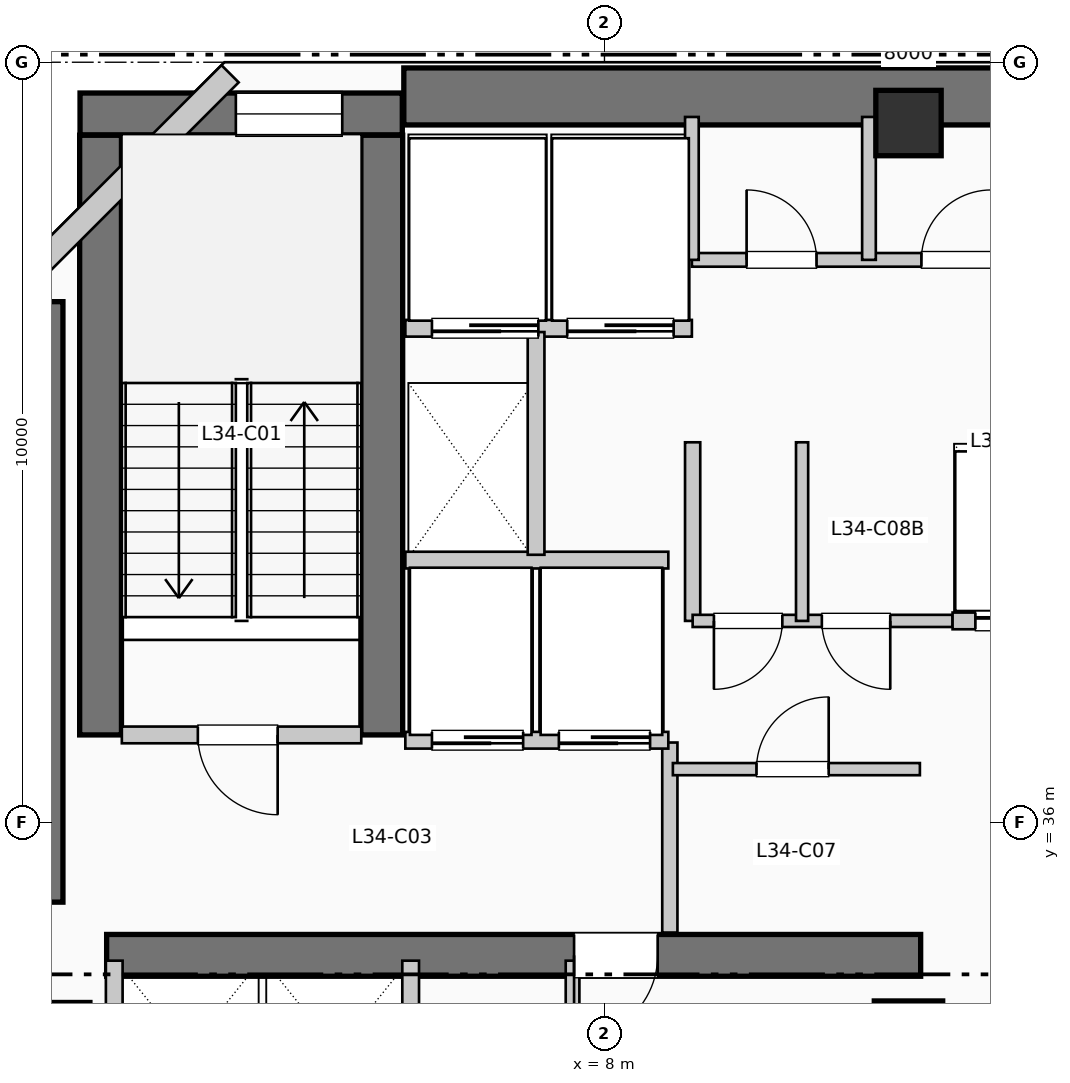
"""IFC4 building model, lengths in metres.
Left out: names, types, materials, properties, quantities, classifications, styles, units other than length and angle.
Written with IfcOpenShell. Run it as: python <this file> out.ifc"""

import sys

from ifc_helpers import new_model, si_unit, direction, frame, frame_2d, origin, origin_2d, place, context, subcontext, project, spatial, rectangle, extrude, element, fill, save


model = new_model("IFC4")
c1 = context("Model", 3, precision=1e-05, world=origin(), true_north=direction((0.0, 1.0)))
c2 = subcontext(c1, "Body", "Model", "MODEL_VIEW")
j1 = project(units=[si_unit("LENGTHUNIT", "METRE"), si_unit("PLANEANGLEUNIT", "RADIAN")], contexts=[c1])
p1 = place(None, origin())
s1 = spatial("IfcSite", under=j1, at=p1, CompositionType="ELEMENT")
p2 = place(p1, origin())
s2 = spatial("IfcBuilding", under=s1, at=p2, CompositionType="ELEMENT")
p3 = place(p2, frame((0.0, 0.0, 142.89)))
s3 = spatial("IfcBuildingStorey", under=s2, at=p3, CompositionType="ELEMENT", Elevation=142.89)
p4 = place(p3, frame((5.36, 45.55, 0.0), z_axis=(0.0, 0.0, 1.0), x_axis=(1.0, 0.0, 0.0)))
e1 = element("IfcWall", 1, at=p4, inside=s3, PredefinedType="SHEAR", context=c2, shape_type="SweptSolid", body=[
    extrude(rectangle(XDim=13.98, YDim=0.75, at=frame_2d((6.99, 0.0))), origin(), (0.0, 0.0, 1.0), 3.96),
])
p5 = place(p3, frame((0.5, 34.95, 0.0), z_axis=(0.0, 0.0, 1.0), x_axis=(0.0, 1.0, 0.0)))
e2 = element("IfcWall", 2, at=p5, inside=s3, PredefinedType="SHEAR", context=c2, shape_type="SweptSolid", body=[
    extrude(rectangle(XDim=7.9, YDim=0.75, at=frame_2d((3.95, 0.0))), origin(), (0.0, 0.0, 1.0), 3.96),
])
p6 = place(p3, frame((1.45, 34.25, 0.0), z_axis=(0.0, 0.0, 1.0), x_axis=(1.0, 0.0, 0.0)))
e3 = element("IfcWall", 3, at=p6, inside=s3, PredefinedType="SHEAR", context=c2, shape_type="SweptSolid", body=[
    extrude(rectangle(XDim=10.71, YDim=0.55, at=frame_2d((5.355, 0.0))), origin(), (0.0, 0.0, 1.0), 3.96),
])
p7 = place(p6, frame((7.25, 0.0, 0.0), z_axis=(0.0, 0.0, 1.0), x_axis=(-1.0, 0.0, 0.0)))
e4 = element("IfcOpeningElement", 4, at=p7, cuts=e3, PredefinedType="OPENING", context=c2, shape_type="SweptSolid", body=[
    extrude(rectangle(XDim=1.1, YDim=2.15, at=frame_2d((0.55, 1.075))), frame((0.0, 0.285, 0.0), z_axis=(0.0, -1.0, 0.0), x_axis=(1.0, 0.0, 0.0)), (0.0, 0.0, 1.0), 0.57),
])
for number, where, z_axis, x_axis in (
    (5, (1.37, 37.15, 0.0), (0.0, 0.0, 1.0), (0.0, 1.0, 0.0)),
    (6, (5.07, 37.15, 0.0), (0.0, 0.0, 1.0), (0.0, 1.0, 0.0)),
):
    element("IfcWall", number, at=place(p3, frame(where, z_axis=z_axis, x_axis=x_axis)), inside=s3, PredefinedType="SHEAR", context=c2, shape_type="SweptSolid", body=[
        extrude(rectangle(XDim=7.89, YDim=0.55, at=frame_2d((3.945, 0.0))), origin(), (0.0, 0.0, 1.0), 3.96),
    ])
p8 = place(p3, frame((1.1, 45.32, 0.0), z_axis=(0.0, 0.0, 1.0), x_axis=(1.0, 0.0, 0.0)))
e7 = element("IfcWall", 7, at=p8, inside=s3, PredefinedType="SHEAR", context=c2, shape_type="SweptSolid", body=[
    extrude(rectangle(XDim=4.24, YDim=0.55, at=frame_2d((2.12, 0.0))), origin(), (0.0, 0.0, 1.0), 3.96),
])
p9 = place(p8, frame((2.05, 0.0, 1.05)))
e8 = element("IfcOpeningElement", 8, at=p9, cuts=e7, PredefinedType="OPENING", context=c2, shape_type="SweptSolid", body=[
    extrude(rectangle(XDim=1.4, YDim=1.8, at=frame_2d((0.7, 0.9))), frame((0.0, 0.285, 0.0), z_axis=(0.0, -1.0, 0.0), x_axis=(1.0, 0.0, 0.0)), (0.0, 0.0, 1.0), 0.57),
])
p10 = place(p3, frame((0.8, 33.2, 0.0), z_axis=(0.0, 0.0, 1.0), x_axis=(1.0, 0.0, 0.0)))
e9 = element("IfcColumn", 9, at=p10, inside=s3, PredefinedType="COLUMN", context=c2, shape_type="SweptSolid", body=[
    extrude(rectangle(XDim=0.86, YDim=0.86, at=origin_2d()), origin(), (0.0, 0.0, 1.0), 3.96),
])
p11 = place(p3, frame((12.0, 33.2, 0.0), z_axis=(0.0, 0.0, 1.0), x_axis=(1.0, 0.0, 0.0)))
e10 = element("IfcColumn", 10, at=p11, inside=s3, PredefinedType="COLUMN", context=c2, shape_type="SweptSolid", body=[
    extrude(rectangle(XDim=0.9, YDim=0.9, at=origin_2d()), origin(), (0.0, 0.0, 1.0), 3.96),
])
p12 = place(p3, frame((12.0, 45.2, 0.0), z_axis=(0.0, 0.0, 1.0), x_axis=(1.0, 0.0, 0.0)))
e11 = element("IfcColumn", 11, at=p12, inside=s3, PredefinedType="COLUMN", context=c2, shape_type="SweptSolid", body=[
    extrude(rectangle(XDim=0.86, YDim=0.86, at=origin_2d()), origin(), (0.0, 0.0, 1.0), 3.96),
])
p13 = place(p3, frame((3.074, 45.848, 0.0), z_axis=(0.0, 0.0, 1.0), x_axis=(-0.707106781187, -0.707106781187, 0.0)))
e12 = element("IfcWall", 12, at=p13, inside=s3, PredefinedType="SOLIDWALL", context=c2, shape_type="SweptSolid", body=[
    extrude(rectangle(XDim=4.133, YDim=0.32, at=frame_2d((2.066, 0.0))), origin(), (0.0, 0.0, 1.0), 3.71),
])
p14 = place(p3, frame((1.65, 37.15, 0.0), z_axis=(0.0, 0.0, 1.0), x_axis=(1.0, 0.0, 0.0)))
e13 = element("IfcWall", 13, at=p14, inside=s3, PredefinedType="PARTITIONING", context=c2, shape_type="SweptSolid", body=[
    extrude(rectangle(XDim=3.15, YDim=0.22, at=frame_2d((1.575, 0.0))), origin(), (0.0, 0.0, 1.0), 3.71),
])
p15 = place(p14, frame((2.05, 0.0, 0.0), z_axis=(0.0, 0.0, 1.0), x_axis=(-1.0, 0.0, 0.0)))
e14 = element("IfcOpeningElement", 14, at=p15, cuts=e13, PredefinedType="OPENING", context=c2, shape_type="SweptSolid", body=[
    extrude(rectangle(XDim=1.05, YDim=2.15, at=frame_2d((0.525, 1.075))), frame((0.0, 0.12, 0.0), z_axis=(0.0, -1.0, 0.0), x_axis=(1.0, 0.0, 0.0)), (0.0, 0.0, 1.0), 0.24),
])
p16 = place(p3, frame((8.86, 34.55, 0.0), z_axis=(0.0, 0.0, 1.0), x_axis=(0.0, 1.0, 0.0)))
e15 = element("IfcWall", 15, at=p16, inside=s3, PredefinedType="PARTITIONING", context=c2, shape_type="SweptSolid", body=[
    extrude(rectangle(XDim=2.5, YDim=0.2, at=frame_2d((1.25, 0.0))), origin(), (0.0, 0.0, 1.0), 3.71),
])
p17 = place(p3, frame((5.38, 37.08, 0.0), z_axis=(0.0, 0.0, 1.0), x_axis=(1.0, 0.0, 0.0)))
e16 = element("IfcWall", 16, at=p17, inside=s3, PredefinedType="PARTITIONING", context=c2, shape_type="SweptSolid", body=[
    extrude(rectangle(XDim=3.46, YDim=0.22, at=frame_2d((1.73, 0.0))), origin(), (0.0, 0.0, 1.0), 3.71),
])
p18 = place(p17, frame((1.55, 0.0, 0.0), z_axis=(0.0, 0.0, 1.0), x_axis=(-1.0, 0.0, 0.0)))
e17 = element("IfcOpeningElement", 17, at=p18, cuts=e16, PredefinedType="OPENING", context=c2, shape_type="SweptSolid", body=[
    extrude(rectangle(XDim=1.2, YDim=2.2, at=frame_2d((0.6, 1.1))), frame((0.0, 0.12, 0.0), z_axis=(0.0, -1.0, 0.0), x_axis=(1.0, 0.0, 0.0)), (0.0, 0.0, 1.0), 0.24),
])
p19 = place(p17, frame((3.22, 0.0, 0.0), z_axis=(0.0, 0.0, 1.0), x_axis=(-1.0, 0.0, 0.0)))
e18 = element("IfcOpeningElement", 18, at=p19, cuts=e16, PredefinedType="OPENING", context=c2, shape_type="SweptSolid", body=[
    extrude(rectangle(XDim=1.2, YDim=2.2, at=frame_2d((0.6, 1.1))), frame((0.0, 0.12, 0.0), z_axis=(0.0, -1.0, 0.0), x_axis=(1.0, 0.0, 0.0)), (0.0, 0.0, 1.0), 0.24),
])
p20 = place(p3, frame((5.38, 39.45, 0.0), z_axis=(0.0, 0.0, 1.0), x_axis=(1.0, 0.0, 0.0)))
e19 = element("IfcWall", 19, at=p20, inside=s3, PredefinedType="PARTITIONING", context=c2, shape_type="SweptSolid", body=[
    extrude(rectangle(XDim=3.46, YDim=0.22, at=frame_2d((1.73, 0.0))), origin(), (0.0, 0.0, 1.0), 3.71),
])
p21 = place(p3, frame((5.38, 42.5, 0.0), z_axis=(0.0, 0.0, 1.0), x_axis=(1.0, 0.0, 0.0)))
e20 = element("IfcWall", 20, at=p21, inside=s3, PredefinedType="PARTITIONING", context=c2, shape_type="SweptSolid", body=[
    extrude(rectangle(XDim=3.77, YDim=0.22, at=frame_2d((1.885, 0.0))), origin(), (0.0, 0.0, 1.0), 3.71),
])
p22 = place(p21, frame((1.75, 0.0, 0.0), z_axis=(0.0, 0.0, 1.0), x_axis=(-1.0, 0.0, 0.0)))
e21 = element("IfcOpeningElement", 21, at=p22, cuts=e20, PredefinedType="OPENING", context=c2, shape_type="SweptSolid", body=[
    extrude(rectangle(XDim=1.4, YDim=2.2, at=frame_2d((0.7, 1.1))), frame((0.0, 0.12, 0.0), z_axis=(0.0, -1.0, 0.0), x_axis=(1.0, 0.0, 0.0)), (0.0, 0.0, 1.0), 0.24),
])
p23 = place(p21, frame((3.53, 0.0, 0.0), z_axis=(0.0, 0.0, 1.0), x_axis=(-1.0, 0.0, 0.0)))
e22 = element("IfcOpeningElement", 22, at=p23, cuts=e20, PredefinedType="OPENING", context=c2, shape_type="SweptSolid", body=[
    extrude(rectangle(XDim=1.4, YDim=2.2, at=frame_2d((0.7, 1.1))), frame((0.0, 0.12, 0.0), z_axis=(0.0, -1.0, 0.0), x_axis=(1.0, 0.0, 0.0)), (0.0, 0.0, 1.0), 0.24),
])
p24 = place(p3, frame((7.1, 39.52, 0.0), z_axis=(0.0, 0.0, 1.0), x_axis=(0.0, 1.0, 0.0)))
e23 = element("IfcWall", 23, at=p24, inside=s3, PredefinedType="PARTITIONING", context=c2, shape_type="SweptSolid", body=[
    extrude(rectangle(XDim=2.93, YDim=0.22, at=frame_2d((1.465, 0.0))), origin(), (0.0, 0.0, 1.0), 3.71),
])
for number, where, z_axis, x_axis in (
    (24, (1.55, 31.8, 0.0), (0.0, 0.0, 1.0), (0.0, 1.0, 0.0)),
    (25, (5.45, 31.8, 0.0), (0.0, 0.0, 1.0), (0.0, 1.0, 0.0)),
):
    element("IfcWall", number, at=place(p3, frame(where, z_axis=z_axis, x_axis=x_axis)), inside=s3, PredefinedType="PARTITIONING", context=c2, shape_type="SweptSolid", body=[
        extrude(rectangle(XDim=2.38, YDim=0.22, at=frame_2d((1.19, 0.0))), origin(), (0.0, 0.0, 1.0), 3.71),
    ])
p25 = place(p3, frame((9.16, 38.65, 0.0), z_axis=(0.0, 0.0, 1.0), x_axis=(0.0, 1.0, 0.0)))
e26 = element("IfcWall", 26, at=p25, inside=s3, PredefinedType="PARTITIONING", context=c2, shape_type="SweptSolid", body=[
    extrude(rectangle(XDim=2.35, YDim=0.2, at=frame_2d((1.175, 0.0))), origin(), (0.0, 0.0, 1.0), 3.71),
])
p26 = place(p3, frame((7.58, 31.82, 0.0), z_axis=(0.0, 0.0, 1.0), x_axis=(0.0, 1.0, 0.0)))
e27 = element("IfcWall", 27, at=p26, inside=s3, PredefinedType="PLUMBINGWALL", context=c2, shape_type="SweptSolid", body=[
    extrude(rectangle(XDim=2.36, YDim=0.18, at=frame_2d((1.18, 0.0))), origin(), (0.0, 0.0, 1.0), 3.71),
])
p27 = place(p3, frame((8.9, 36.7, 0.0), z_axis=(0.0, 0.0, 1.0), x_axis=(1.0, 0.0, 0.0)))
e28 = element("IfcWall", 28, at=p27, inside=s3, PredefinedType="PARTITIONING", context=c2, shape_type="SweptSolid", body=[
    extrude(rectangle(XDim=3.25, YDim=0.16, at=frame_2d((1.625, 0.0))), origin(), (0.0, 0.0, 1.0), 3.71),
])
p28 = place(p27, frame((1.1, 0.0, 0.0)))
e29 = element("IfcOpeningElement", 29, at=p28, cuts=e28, PredefinedType="OPENING", context=c2, shape_type="SweptSolid", body=[
    extrude(rectangle(XDim=0.95, YDim=2.15, at=frame_2d((0.475, 1.075))), frame((0.0, 0.09, 0.0), z_axis=(0.0, -1.0, 0.0), x_axis=(1.0, 0.0, 0.0)), (0.0, 0.0, 1.0), 0.18),
])
p29 = place(p3, frame((9.16, 38.65, 0.0), z_axis=(0.0, 0.0, 1.0), x_axis=(1.0, 0.0, 0.0)))
e30 = element("IfcWall", 30, at=p29, inside=s3, PredefinedType="PARTITIONING", context=c2, shape_type="SweptSolid", body=[
    extrude(rectangle(XDim=3.42, YDim=0.16, at=frame_2d((1.71, 0.0))), origin(), (0.0, 0.0, 1.0), 3.71),
])
p30 = place(p29, frame((1.18, 0.0, 0.0), z_axis=(0.0, 0.0, 1.0), x_axis=(-1.0, 0.0, 0.0)))
e31 = element("IfcOpeningElement", 31, at=p30, cuts=e30, PredefinedType="OPENING", context=c2, shape_type="SweptSolid", body=[
    extrude(rectangle(XDim=0.9, YDim=2.15, at=frame_2d((0.45, 1.075))), frame((0.0, 0.09, 0.0), z_axis=(0.0, -1.0, 0.0), x_axis=(1.0, 0.0, 0.0)), (0.0, 0.0, 1.0), 0.18),
])
p31 = place(p29, frame((2.6, 0.0, 0.0), z_axis=(0.0, 0.0, 1.0), x_axis=(-1.0, 0.0, 0.0)))
e32 = element("IfcOpeningElement", 32, at=p31, cuts=e30, PredefinedType="OPENING", context=c2, shape_type="SweptSolid", body=[
    extrude(rectangle(XDim=0.9, YDim=2.15, at=frame_2d((0.45, 1.075))), frame((0.0, 0.09, 0.0), z_axis=(0.0, -1.0, 0.0), x_axis=(1.0, 0.0, 0.0)), (0.0, 0.0, 1.0), 0.18),
])
p32 = place(p3, frame((10.6, 38.65, 0.0), z_axis=(0.0, 0.0, 1.0), x_axis=(0.0, 1.0, 0.0)))
e33 = element("IfcWall", 33, at=p32, inside=s3, PredefinedType="PARTITIONING", context=c2, shape_type="SweptSolid", body=[
    extrude(rectangle(XDim=2.35, YDim=0.16, at=frame_2d((1.175, 0.0))), origin(), (0.0, 0.0, 1.0), 3.71),
])
p33 = place(p3, frame((12.58, 38.65, 0.0), z_axis=(0.0, 0.0, 1.0), x_axis=(1.0, 0.0, 0.0)))
e34 = element("IfcWall", 34, at=p33, inside=s3, PredefinedType="PARTITIONING", context=c2, shape_type="SweptSolid", body=[
    extrude(rectangle(XDim=3.38, YDim=0.22, at=frame_2d((1.69, 0.0))), origin(), (0.0, 0.0, 1.0), 3.71),
])
p34 = place(p33, frame((0.3, 0.0, 0.0)))
e35 = element("IfcOpeningElement", 35, at=p34, cuts=e34, PredefinedType="OPENING", context=c2, shape_type="SweptSolid", body=[
    extrude(rectangle(XDim=1.1, YDim=2.2, at=frame_2d((0.55, 1.1))), frame((0.0, 0.12, 0.0), z_axis=(0.0, -1.0, 0.0), x_axis=(1.0, 0.0, 0.0)), (0.0, 0.0, 1.0), 0.24),
])
p35 = place(p33, frame((1.95, 0.0, 0.0)))
e36 = element("IfcOpeningElement", 36, at=p35, cuts=e34, PredefinedType="OPENING", context=c2, shape_type="SweptSolid", body=[
    extrude(rectangle(XDim=1.1, YDim=2.2, at=frame_2d((0.55, 1.1))), frame((0.0, 0.12, 0.0), z_axis=(0.0, -1.0, 0.0), x_axis=(1.0, 0.0, 0.0)), (0.0, 0.0, 1.0), 0.24),
])
p36 = place(p3, frame((9.15, 43.4, 0.0), z_axis=(0.0, 0.0, 1.0), x_axis=(1.0, 0.0, 0.0)))
e37 = element("IfcWall", 37, at=p36, inside=s3, PredefinedType="PLUMBINGWALL", context=c2, shape_type="SweptSolid", body=[
    extrude(rectangle(XDim=9.33, YDim=0.18, at=frame_2d((4.665, 0.0))), origin(), (0.0, 0.0, 1.0), 3.71),
])
p37 = place(p36, frame((0.72, 0.0, 0.0)))
e38 = element("IfcOpeningElement", 38, at=p37, cuts=e37, PredefinedType="OPENING", context=c2, shape_type="SweptSolid", body=[
    extrude(rectangle(XDim=0.92, YDim=2.1, at=frame_2d((0.46, 1.05))), frame((0.0, 0.1, 0.0), z_axis=(0.0, -1.0, 0.0), x_axis=(1.0, 0.0, 0.0)), (0.0, 0.0, 1.0), 0.2),
])
p38 = place(p36, frame((3.02, 0.0, 0.0)))
e39 = element("IfcOpeningElement", 39, at=p38, cuts=e37, PredefinedType="OPENING", context=c2, shape_type="SweptSolid", body=[
    extrude(rectangle(XDim=0.92, YDim=2.1, at=frame_2d((0.46, 1.05))), frame((0.0, 0.1, 0.0), z_axis=(0.0, -1.0, 0.0), x_axis=(1.0, 0.0, 0.0)), (0.0, 0.0, 1.0), 0.2),
])
p39 = place(p36, frame((5.34, 0.0, 0.0)))
e40 = element("IfcOpeningElement", 40, at=p39, cuts=e37, PredefinedType="OPENING", context=c2, shape_type="SweptSolid", body=[
    extrude(rectangle(XDim=0.92, YDim=2.1, at=frame_2d((0.46, 1.05))), frame((0.0, 0.1, 0.0), z_axis=(0.0, -1.0, 0.0), x_axis=(1.0, 0.0, 0.0)), (0.0, 0.0, 1.0), 0.2),
])
p40 = place(p36, frame((7.66, 0.0, 0.0)))
e41 = element("IfcOpeningElement", 41, at=p40, cuts=e37, PredefinedType="OPENING", context=c2, shape_type="SweptSolid", body=[
    extrude(rectangle(XDim=0.95, YDim=2.1, at=frame_2d((0.475, 1.05))), frame((0.0, 0.1, 0.0), z_axis=(0.0, -1.0, 0.0), x_axis=(1.0, 0.0, 0.0)), (0.0, 0.0, 1.0), 0.2),
])
for number, where, z_axis, x_axis in (
    (42, (9.15, 43.4, 0.0), (0.0, 0.0, 1.0), (0.0, 1.0, 0.0)),
    (43, (11.48, 43.4, 0.0), (0.0, 0.0, 1.0), (0.0, 1.0, 0.0)),
):
    element("IfcWall", number, at=place(p3, frame(where, z_axis=z_axis, x_axis=x_axis)), inside=s3, PredefinedType="PLUMBINGWALL", context=c2, shape_type="SweptSolid", body=[
        extrude(rectangle(XDim=1.88, YDim=0.18, at=frame_2d((0.94, 0.0))), origin(), (0.0, 0.0, 1.0), 3.71),
    ])
p41 = place(p9, origin())
e44 = element("IfcWindow", 44, at=p41, inside=s3, PartitioningType="SINGLE_PANEL", PredefinedType="WINDOW", context=c2, shape_type="SweptSolid", body=[
    extrude(rectangle(XDim=1.4, YDim=1.8, at=frame_2d((0.7, 0.9))), frame((0.0, 0.03, 0.0), z_axis=(0.0, -1.0, 0.0), x_axis=(1.0, 0.0, 0.0)), (0.0, 0.0, 1.0), 0.06),
])
fill(e8, e44)
p42 = place(p15, origin())
e45 = element("IfcDoor", 45, at=p42, inside=s3, OperationType="SINGLE_SWING_RIGHT", PredefinedType="DOOR", context=c2, shape_type="SweptSolid", body=[
    extrude(rectangle(XDim=1.05, YDim=2.15, at=frame_2d((0.525, 1.075))), frame((0.0, 0.025, 0.0), z_axis=(0.0, -1.0, 0.0), x_axis=(1.0, 0.0, 0.0)), (0.0, 0.0, 1.0), 0.05),
])
fill(e14, e45)
p43 = place(p7, origin())
e46 = element("IfcDoor", 46, at=p43, inside=s3, OperationType="SINGLE_SWING_LEFT", PredefinedType="DOOR", context=c2, shape_type="SweptSolid", body=[
    extrude(rectangle(XDim=1.1, YDim=2.15, at=frame_2d((0.55, 1.075))), frame((0.0, 0.025, 0.0), z_axis=(0.0, -1.0, 0.0), x_axis=(1.0, 0.0, 0.0)), (0.0, 0.0, 1.0), 0.05),
])
fill(e4, e46)
p44 = place(p18, origin())
e47 = element("IfcDoor", 47, at=p44, inside=s3, OperationType="SLIDING_TO_RIGHT", PredefinedType="DOOR", context=c2, shape_type="SweptSolid", body=[
    extrude(rectangle(XDim=1.2, YDim=2.2, at=frame_2d((0.6, 1.1))), frame((0.0, 0.025, 0.0), z_axis=(0.0, -1.0, 0.0), x_axis=(1.0, 0.0, 0.0)), (0.0, 0.0, 1.0), 0.05),
])
fill(e17, e47)
p45 = place(p19, origin())
e48 = element("IfcDoor", 48, at=p45, inside=s3, OperationType="SLIDING_TO_RIGHT", PredefinedType="DOOR", context=c2, shape_type="SweptSolid", body=[
    extrude(rectangle(XDim=1.2, YDim=2.2, at=frame_2d((0.6, 1.1))), frame((0.0, 0.025, 0.0), z_axis=(0.0, -1.0, 0.0), x_axis=(1.0, 0.0, 0.0)), (0.0, 0.0, 1.0), 0.05),
])
fill(e18, e48)
p46 = place(p22, origin())
e49 = element("IfcDoor", 49, at=p46, inside=s3, OperationType="SLIDING_TO_LEFT", PredefinedType="DOOR", context=c2, shape_type="SweptSolid", body=[
    extrude(rectangle(XDim=1.4, YDim=2.2, at=frame_2d((0.7, 1.1))), frame((0.0, 0.025, 0.0), z_axis=(0.0, -1.0, 0.0), x_axis=(1.0, 0.0, 0.0)), (0.0, 0.0, 1.0), 0.05),
])
fill(e21, e49)
p47 = place(p23, origin())
e50 = element("IfcDoor", 50, at=p47, inside=s3, OperationType="SLIDING_TO_LEFT", PredefinedType="DOOR", context=c2, shape_type="SweptSolid", body=[
    extrude(rectangle(XDim=1.4, YDim=2.2, at=frame_2d((0.7, 1.1))), frame((0.0, 0.025, 0.0), z_axis=(0.0, -1.0, 0.0), x_axis=(1.0, 0.0, 0.0)), (0.0, 0.0, 1.0), 0.05),
])
fill(e22, e50)
p48 = place(p28, origin())
e51 = element("IfcDoor", 51, at=p48, inside=s3, OperationType="SINGLE_SWING_RIGHT", PredefinedType="DOOR", context=c2, shape_type="SweptSolid", body=[
    extrude(rectangle(XDim=0.95, YDim=2.15, at=frame_2d((0.475, 1.075))), frame((0.0, 0.025, 0.0), z_axis=(0.0, -1.0, 0.0), x_axis=(1.0, 0.0, 0.0)), (0.0, 0.0, 1.0), 0.05),
])
fill(e29, e51)
p49 = place(p30, origin())
e52 = element("IfcDoor", 52, at=p49, inside=s3, OperationType="SINGLE_SWING_LEFT", PredefinedType="DOOR", context=c2, shape_type="SweptSolid", body=[
    extrude(rectangle(XDim=0.9, YDim=2.15, at=frame_2d((0.45, 1.075))), frame((0.0, 0.025, 0.0), z_axis=(0.0, -1.0, 0.0), x_axis=(1.0, 0.0, 0.0)), (0.0, 0.0, 1.0), 0.05),
])
fill(e31, e52)
p50 = place(p31, origin())
e53 = element("IfcDoor", 53, at=p50, inside=s3, OperationType="SINGLE_SWING_RIGHT", PredefinedType="DOOR", context=c2, shape_type="SweptSolid", body=[
    extrude(rectangle(XDim=0.9, YDim=2.15, at=frame_2d((0.45, 1.075))), frame((0.0, 0.025, 0.0), z_axis=(0.0, -1.0, 0.0), x_axis=(1.0, 0.0, 0.0)), (0.0, 0.0, 1.0), 0.05),
])
fill(e32, e53)
p51 = place(p34, origin())
e54 = element("IfcDoor", 54, at=p51, inside=s3, OperationType="SLIDING_TO_RIGHT", PredefinedType="DOOR", context=c2, shape_type="SweptSolid", body=[
    extrude(rectangle(XDim=1.1, YDim=2.2, at=frame_2d((0.55, 1.1))), frame((0.0, 0.025, 0.0), z_axis=(0.0, -1.0, 0.0), x_axis=(1.0, 0.0, 0.0)), (0.0, 0.0, 1.0), 0.05),
])
fill(e35, e54)
p52 = place(p37, origin())
e55 = element("IfcDoor", 55, at=p52, inside=s3, OperationType="SINGLE_SWING_LEFT", PredefinedType="DOOR", context=c2, shape_type="SweptSolid", body=[
    extrude(rectangle(XDim=0.92, YDim=2.1, at=frame_2d((0.46, 1.05))), frame((0.0, 0.025, 0.0), z_axis=(0.0, -1.0, 0.0), x_axis=(1.0, 0.0, 0.0)), (0.0, 0.0, 1.0), 0.05),
])
fill(e38, e55)
p53 = place(p38, origin())
e56 = element("IfcDoor", 56, at=p53, inside=s3, OperationType="SINGLE_SWING_RIGHT", PredefinedType="DOOR", context=c2, shape_type="SweptSolid", body=[
    extrude(rectangle(XDim=0.92, YDim=2.1, at=frame_2d((0.46, 1.05))), frame((0.0, 0.025, 0.0), z_axis=(0.0, -1.0, 0.0), x_axis=(1.0, 0.0, 0.0)), (0.0, 0.0, 1.0), 0.05),
])
fill(e39, e56)
save(model, sys.argv[1])
